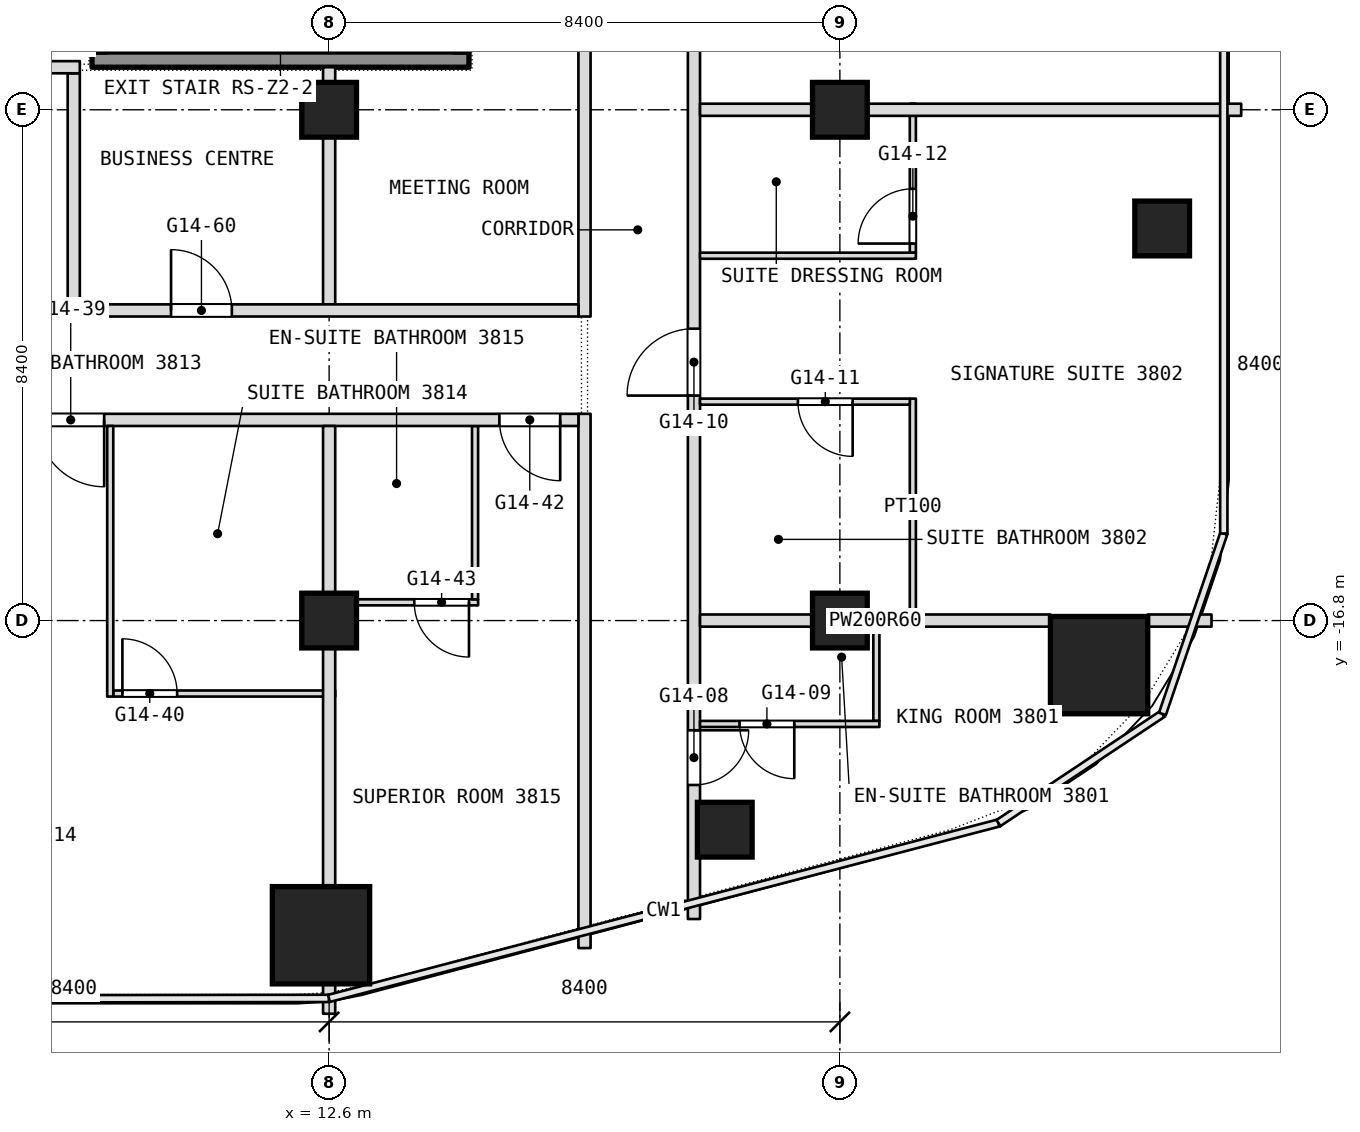
"""IFC4 building model, lengths in metres.
Left out: names, types, materials, properties, quantities, classifications, styles, units other than length and angle.
Written with IfcOpenShell. Run it as: python <this file> out.ifc"""

import sys

from ifc_helpers import new_model, si_unit, direction, frame, frame_2d, origin, origin_2d, place, context, subcontext, project, spatial, rectangle, extrude, element, fill, save


model = new_model("IFC4")
c1 = context("Model", 3, precision=1e-05, world=origin(), true_north=direction((0.0, 1.0)))
c2 = subcontext(c1, "Body", "Model", "MODEL_VIEW")
j1 = project(units=[si_unit("LENGTHUNIT", "METRE"), si_unit("PLANEANGLEUNIT", "RADIAN")], contexts=[c1])
p1 = place(None, origin())
s1 = spatial("IfcSite", under=j1, at=p1, CompositionType="ELEMENT")
p2 = place(p1, origin())
s2 = spatial("IfcBuilding", under=s1, at=p2, CompositionType="ELEMENT")
p3 = place(p2, frame((0.0, 0.0, 162.5)))
s3 = spatial("IfcBuildingStorey", under=s2, at=p3, CompositionType="ELEMENT", Elevation=162.5)
for number, where, z_axis, x_axis in (
    (1, (12.466, -21.975, 0.0), (0.0, 0.0, 1.0), (1.0, 0.0, 0.0)),
    (2, (25.263, -17.533, 0.0), (0.0, 0.0, 1.0), (1.0, 0.0, 0.0)),
):
    element("IfcColumn", number, at=place(p3, frame(where, z_axis=z_axis, x_axis=x_axis)), inside=s3, PredefinedType="COLUMN", context=c2, shape_type="SweptSolid", body=[
        extrude(rectangle(XDim=1.6, YDim=1.6, at=origin_2d()), origin(), (0.0, 0.0, 1.0), 3.6),
    ])
for number, where, z_axis, x_axis in (
    (3, (12.6, -16.8, 0.0), (0.0, 0.0, 1.0), (1.0, 0.0, 0.0)),
    (4, (12.6, -8.4, 0.0), (0.0, 0.0, 1.0), (1.0, 0.0, 0.0)),
    (5, (21.0, -16.8, 0.0), (0.0, 0.0, 1.0), (1.0, 0.0, 0.0)),
    (6, (21.0, -8.4, 0.0), (0.0, 0.0, 1.0), (1.0, 0.0, 0.0)),
    (7, (26.3, -10.352, 0.0), (0.0, 0.0, 1.0), (1.0, 0.0, 0.0)),
    (8, (19.107, -20.239, 0.0), (0.0, 0.0, 1.0), (1.0, 0.0, 0.0)),
):
    element("IfcColumn", number, at=place(p3, frame(where, z_axis=z_axis, x_axis=x_axis)), inside=s3, PredefinedType="COLUMN", context=c2, shape_type="SweptSolid", body=[
        extrude(rectangle(XDim=0.9, YDim=0.9, at=origin_2d()), origin(), (0.0, 0.0, 1.0), 3.6),
    ])
p4 = place(p3, frame((22.2, -16.7, 0.0), z_axis=(0.0, 0.0, 1.0), x_axis=(0.0, 1.0, 0.0)))
e9 = element("IfcWall", 9, at=p4, inside=s3, PredefinedType="PARTITIONING", context=c2, shape_type="SweptSolid", body=[
    extrude(rectangle(XDim=3.55, YDim=0.1, at=frame_2d((1.775, 0.0))), origin(), (0.0, 0.0, 1.0), 3.34),
])
p5 = place(p3, frame((22.2, -10.75, 0.0), z_axis=(0.0, 0.0, 1.0), x_axis=(0.0, 1.0, 0.0)))
e10 = element("IfcWall", 10, at=p5, inside=s3, PredefinedType="PARTITIONING", context=c2, shape_type="SweptSolid", body=[
    extrude(rectangle(XDim=2.45, YDim=0.1, at=frame_2d((1.225, 0.0))), origin(), (0.0, 0.0, 1.0), 3.34),
])
p6 = place(p5, frame((0.15, 0.0, 0.0)))
e11 = element("IfcOpeningElement", 11, at=p6, cuts=e10, PredefinedType="OPENING", context=c2, shape_type="SweptSolid", body=[
    extrude(rectangle(XDim=0.9, YDim=2.1, at=frame_2d((0.45, 1.05))), frame((0.0, 0.05, 0.0), z_axis=(0.0, -1.0, 0.0), x_axis=(1.0, 0.0, 0.0)), (0.0, 0.0, 1.0), 0.1),
])
p7 = place(p3, frame((21.6, -18.45, 0.0), z_axis=(0.0, 0.0, 1.0), x_axis=(0.0, 1.0, 0.0)))
e12 = element("IfcWall", 12, at=p7, inside=s3, PredefinedType="PARTITIONING", context=c2, shape_type="SweptSolid", body=[
    extrude(rectangle(XDim=1.75, YDim=0.1, at=frame_2d((0.875, 0.0))), origin(), (0.0, 0.0, 1.0), 3.34),
])
p8 = place(p3, frame((18.6, -21.708, 0.0), z_axis=(0.0, 0.0, 1.0), x_axis=(0.0, 1.0, 0.0)))
e13 = element("IfcWall", 13, at=p8, inside=s3, PredefinedType="PARTITIONING", context=c2, shape_type="SweptSolid", body=[
    extrude(rectangle(XDim=49.648, YDim=0.2, at=frame_2d((24.824, 0.0))), origin(), (0.0, 0.0, 1.0), 3.34),
])
p9 = place(p8, frame((2.204, 0.0, 0.0)))
e14 = element("IfcOpeningElement", 14, at=p9, cuts=e13, PredefinedType="OPENING", context=c2, shape_type="SweptSolid", body=[
    extrude(rectangle(XDim=0.9, YDim=2.1, at=frame_2d((0.45, 1.05))), frame((0.0, 0.1, 0.0), z_axis=(0.0, -1.0, 0.0), x_axis=(1.0, 0.0, 0.0)), (0.0, 0.0, 1.0), 0.2),
])
p10 = place(p8, frame((8.608, 0.0, 0.0)))
e15 = element("IfcOpeningElement", 15, at=p10, cuts=e13, PredefinedType="OPENING", context=c2, shape_type="SweptSolid", body=[
    extrude(rectangle(XDim=1.1, YDim=2.1, at=frame_2d((0.55, 1.05))), frame((0.0, 0.1, 0.0), z_axis=(0.0, -1.0, 0.0), x_axis=(1.0, 0.0, 0.0)), (0.0, 0.0, 1.0), 0.2),
])
p11 = place(p8, frame((16.608, 0.0, 0.0)))
e16 = element("IfcOpeningElement", 16, at=p11, cuts=e13, PredefinedType="OPENING", context=c2, shape_type="SweptSolid", body=[
    extrude(rectangle(XDim=1.8, YDim=2.1, at=frame_2d((0.9, 1.05))), frame((0.0, 0.1, 0.0), z_axis=(0.0, -1.0, 0.0), x_axis=(1.0, 0.0, 0.0)), (0.0, 0.0, 1.0), 0.2),
])
p12 = place(p8, frame((27.458, 0.0, 0.0)))
e17 = element("IfcOpeningElement", 17, at=p12, cuts=e13, PredefinedType="OPENING", context=c2, shape_type="SweptSolid", body=[
    extrude(rectangle(XDim=1.1, YDim=2.1, at=frame_2d((0.55, 1.05))), frame((0.0, 0.1, 0.0), z_axis=(0.0, -1.0, 0.0), x_axis=(1.0, 0.0, 0.0)), (0.0, 0.0, 1.0), 0.2),
])
p13 = place(p8, frame((30.508, 0.0, 0.0)))
e18 = element("IfcOpeningElement", 18, at=p13, cuts=e13, PredefinedType="OPENING", context=c2, shape_type="SweptSolid", body=[
    extrude(rectangle(XDim=1.0, YDim=2.1, at=frame_2d((0.5, 1.05))), frame((0.0, 0.1, 0.0), z_axis=(0.0, -1.0, 0.0), x_axis=(1.0, 0.0, 0.0)), (0.0, 0.0, 1.0), 0.2),
])
p14 = place(p8, frame((37.108, 0.0, 0.0)))
e19 = element("IfcOpeningElement", 19, at=p14, cuts=e13, PredefinedType="OPENING", context=c2, shape_type="SweptSolid", body=[
    extrude(rectangle(XDim=1.0, YDim=2.1, at=frame_2d((0.5, 1.05))), frame((0.0, 0.1, 0.0), z_axis=(0.0, -1.0, 0.0), x_axis=(1.0, 0.0, 0.0)), (0.0, 0.0, 1.0), 0.2),
])
p15 = place(p8, frame((42.608, 0.0, 0.0)))
e20 = element("IfcOpeningElement", 20, at=p15, cuts=e13, PredefinedType="OPENING", context=c2, shape_type="SweptSolid", body=[
    extrude(rectangle(XDim=1.0, YDim=2.1, at=frame_2d((0.5, 1.05))), frame((0.0, 0.1, 0.0), z_axis=(0.0, -1.0, 0.0), x_axis=(1.0, 0.0, 0.0)), (0.0, 0.0, 1.0), 0.2),
])
p16 = place(p8, frame((44.608, 0.0, 0.0)))
e21 = element("IfcOpeningElement", 21, at=p16, cuts=e13, PredefinedType="OPENING", context=c2, shape_type="SweptSolid", body=[
    extrude(rectangle(XDim=1.0, YDim=2.1, at=frame_2d((0.5, 1.05))), frame((0.0, 0.1, 0.0), z_axis=(0.0, -1.0, 0.0), x_axis=(1.0, 0.0, 0.0)), (0.0, 0.0, 1.0), 0.2),
])
p17 = place(p3, frame((18.7, -18.5, 0.0), z_axis=(0.0, 0.0, 1.0), x_axis=(1.0, 0.0, 0.0)))
e22 = element("IfcWall", 22, at=p17, inside=s3, PredefinedType="PARTITIONING", context=c2, shape_type="SweptSolid", body=[
    extrude(rectangle(XDim=2.95, YDim=0.1, at=frame_2d((1.475, 0.0))), origin(), (0.0, 0.0, 1.0), 3.34),
])
p18 = place(p17, frame((0.65, 0.0, 0.0)))
e23 = element("IfcOpeningElement", 23, at=p18, cuts=e22, PredefinedType="OPENING", context=c2, shape_type="SweptSolid", body=[
    extrude(rectangle(XDim=0.9, YDim=2.1, at=frame_2d((0.45, 1.05))), frame((0.0, 0.05, 0.0), z_axis=(0.0, -1.0, 0.0), x_axis=(1.0, 0.0, 0.0)), (0.0, 0.0, 1.0), 0.1),
])
p19 = place(p3, frame((9.05, -18.0, 0.0), z_axis=(0.0, 0.0, 1.0), x_axis=(1.0, 0.0, 0.0)))
e24 = element("IfcWall", 24, at=p19, inside=s3, PredefinedType="PARTITIONING", context=c2, shape_type="SweptSolid", body=[
    extrude(rectangle(XDim=3.65, YDim=0.1, at=frame_2d((1.825, 0.0))), origin(), (0.0, 0.0, 1.0), 3.34),
])
p20 = place(p19, frame((0.15, 0.0, 0.0)))
e25 = element("IfcOpeningElement", 25, at=p20, cuts=e24, PredefinedType="OPENING", context=c2, shape_type="SweptSolid", body=[
    extrude(rectangle(XDim=0.9, YDim=2.1, at=frame_2d((0.45, 1.05))), frame((0.0, 0.05, 0.0), z_axis=(0.0, -1.0, 0.0), x_axis=(1.0, 0.0, 0.0)), (0.0, 0.0, 1.0), 0.1),
])
p21 = place(p3, frame((16.8, -22.186, 0.0), z_axis=(0.0, 0.0, 1.0), x_axis=(0.0, 1.0, 0.0)))
e26 = element("IfcWall", 26, at=p21, inside=s3, PredefinedType="PARTITIONING", context=c2, shape_type="SweptSolid", body=[
    extrude(rectangle(XDim=8.786, YDim=0.2, at=frame_2d((4.393, 0.0))), origin(), (0.0, 0.0, 1.0), 3.34),
])
p22 = place(p3, frame((16.8, -11.8, 0.0), z_axis=(0.0, 0.0, 1.0), x_axis=(0.0, 1.0, 0.0)))
e27 = element("IfcWall", 27, at=p22, inside=s3, PredefinedType="PARTITIONING", context=c2, shape_type="SweptSolid", body=[
    extrude(rectangle(XDim=9.9, YDim=0.2, at=frame_2d((4.95, 0.0))), origin(), (0.0, 0.0, 1.0), 3.34),
])
p23 = place(p3, frame((18.7, -16.8, 0.0), z_axis=(0.0, 0.0, 1.0), x_axis=(1.0, 0.0, 0.0)))
e28 = element("IfcWall", 28, at=p23, inside=s3, PredefinedType="PARTITIONING", context=c2, shape_type="SweptSolid", body=[
    extrude(rectangle(XDim=5.763, YDim=0.2, at=frame_2d((2.881, 0.0))), origin(), (0.0, 0.0, 1.0), 2.89),
])
p24 = place(p3, frame((26.063, -16.8, 0.0), z_axis=(0.0, 0.0, 1.0), x_axis=(1.0, 0.0, 0.0)))
e29 = element("IfcWall", 29, at=p24, inside=s3, PredefinedType="PARTITIONING", context=c2, shape_type="SweptSolid", body=[
    extrude(rectangle(XDim=1.049, YDim=0.2, at=frame_2d((0.524, 0.0))), origin(), (0.0, 0.0, 1.0), 3.34),
])
p25 = place(p3, frame((12.7, -16.5, 0.0), z_axis=(0.0, 0.0, 1.0), x_axis=(1.0, 0.0, 0.0)))
e30 = element("IfcWall", 30, at=p25, inside=s3, PredefinedType="PARTITIONING", context=c2, shape_type="SweptSolid", body=[
    extrude(rectangle(XDim=2.35, YDim=0.1, at=frame_2d((1.175, 0.0))), origin(), (0.0, 0.0, 1.0), 3.34),
])
p26 = place(p25, frame((1.3, 0.0, 0.0)))
e31 = element("IfcOpeningElement", 31, at=p26, cuts=e30, PredefinedType="OPENING", context=c2, shape_type="SweptSolid", body=[
    extrude(rectangle(XDim=0.9, YDim=2.1, at=frame_2d((0.45, 1.05))), frame((0.0, 0.05, 0.0), z_axis=(0.0, -1.0, 0.0), x_axis=(1.0, 0.0, 0.0)), (0.0, 0.0, 1.0), 0.1),
])
p27 = place(p3, frame((15.0, -16.45, 0.0), z_axis=(0.0, 0.0, 1.0), x_axis=(0.0, 1.0, 0.0)))
e32 = element("IfcWall", 32, at=p27, inside=s3, PredefinedType="PARTITIONING", context=c2, shape_type="SweptSolid", body=[
    extrude(rectangle(XDim=2.85, YDim=0.1, at=frame_2d((1.425, 0.0))), origin(), (0.0, 0.0, 1.0), 3.34),
])
p28 = place(p3, frame((-3.2, -13.5, 0.0), z_axis=(0.0, 0.0, 1.0), x_axis=(1.0, 0.0, 0.0)))
e33 = element("IfcWall", 33, at=p28, inside=s3, PredefinedType="PARTITIONING", context=c2, shape_type="SweptSolid", body=[
    extrude(rectangle(XDim=19.9, YDim=0.2, at=frame_2d((9.95, 0.0))), origin(), (0.0, 0.0, 1.0), 3.34),
])
p29 = place(p28, frame((1.8, 0.0, 0.0)))
e34 = element("IfcOpeningElement", 34, at=p29, cuts=e33, PredefinedType="OPENING", context=c2, shape_type="SweptSolid", body=[
    extrude(rectangle(XDim=1.0, YDim=2.1, at=frame_2d((0.5, 1.05))), frame((0.0, 0.1, 0.0), z_axis=(0.0, -1.0, 0.0), x_axis=(1.0, 0.0, 0.0)), (0.0, 0.0, 1.0), 0.2),
])
p30 = place(p28, frame((3.6, 0.0, 0.0)))
e35 = element("IfcOpeningElement", 35, at=p30, cuts=e33, PredefinedType="OPENING", context=c2, shape_type="SweptSolid", body=[
    extrude(rectangle(XDim=1.0, YDim=2.1, at=frame_2d((0.5, 1.05))), frame((0.0, 0.1, 0.0), z_axis=(0.0, -1.0, 0.0), x_axis=(1.0, 0.0, 0.0)), (0.0, 0.0, 1.0), 0.2),
])
p31 = place(p28, frame((11.0, 0.0, 0.0)))
e36 = element("IfcOpeningElement", 36, at=p31, cuts=e33, PredefinedType="OPENING", context=c2, shape_type="SweptSolid", body=[
    extrude(rectangle(XDim=1.1, YDim=2.1, at=frame_2d((0.55, 1.05))), frame((0.0, 0.1, 0.0), z_axis=(0.0, -1.0, 0.0), x_axis=(1.0, 0.0, 0.0)), (0.0, 0.0, 1.0), 0.2),
])
p32 = place(p28, frame((18.6, 0.0, 0.0)))
e37 = element("IfcOpeningElement", 37, at=p32, cuts=e33, PredefinedType="OPENING", context=c2, shape_type="SweptSolid", body=[
    extrude(rectangle(XDim=1.0, YDim=2.1, at=frame_2d((0.5, 1.05))), frame((0.0, 0.1, 0.0), z_axis=(0.0, -1.0, 0.0), x_axis=(1.0, 0.0, 0.0)), (0.0, 0.0, 1.0), 0.2),
])
p33 = place(p3, frame((18.7, -13.2, 0.0), z_axis=(0.0, 0.0, 1.0), x_axis=(1.0, 0.0, 0.0)))
e38 = element("IfcWall", 38, at=p33, inside=s3, PredefinedType="PARTITIONING", context=c2, shape_type="SweptSolid", body=[
    extrude(rectangle(XDim=3.45, YDim=0.1, at=frame_2d((1.725, 0.0))), origin(), (0.0, 0.0, 1.0), 3.34),
])
p34 = place(p33, frame((1.61, 0.0, 0.0)))
e39 = element("IfcOpeningElement", 39, at=p34, cuts=e38, PredefinedType="OPENING", context=c2, shape_type="SweptSolid", body=[
    extrude(rectangle(XDim=0.9, YDim=2.1, at=frame_2d((0.45, 1.05))), frame((0.0, 0.05, 0.0), z_axis=(0.0, -1.0, 0.0), x_axis=(1.0, 0.0, 0.0)), (0.0, 0.0, 1.0), 0.1),
])
p35 = place(p3, frame((12.6, -23.266, 0.0), z_axis=(0.0, 0.0, 1.0), x_axis=(0.0, 1.0, 0.0)))
e40 = element("IfcWall", 40, at=p35, inside=s3, PredefinedType="PARTITIONING", context=c2, shape_type="SweptSolid", body=[
    extrude(rectangle(XDim=0.491, YDim=0.2, at=frame_2d((0.246, 0.0))), origin(), (0.0, 0.0, 1.0), 3.34),
])
p36 = place(p3, frame((12.6, -21.175, 0.0), z_axis=(0.0, 0.0, 1.0), x_axis=(0.0, 1.0, 0.0)))
e41 = element("IfcWall", 41, at=p36, inside=s3, PredefinedType="PARTITIONING", context=c2, shape_type="SweptSolid", body=[
    extrude(rectangle(XDim=7.575, YDim=0.2, at=frame_2d((3.788, 0.0))), origin(), (0.0, 0.0, 1.0), 3.34),
])
p37 = place(p3, frame((12.6, -11.6, 0.0), z_axis=(0.0, 0.0, 1.0), x_axis=(0.0, 1.0, 0.0)))
e42 = element("IfcWall", 42, at=p37, inside=s3, PredefinedType="PARTITIONING", context=c2, shape_type="SweptSolid", body=[
    extrude(rectangle(XDim=3.9, YDim=0.2, at=frame_2d((1.95, 0.0))), origin(), (0.0, 0.0, 1.0), 3.34),
])
p38 = place(p3, frame((-4.1, -11.7, 0.0), z_axis=(0.0, 0.0, 1.0), x_axis=(1.0, 0.0, 0.0)))
e43 = element("IfcWall", 43, at=p38, inside=s3, PredefinedType="PARTITIONING", context=c2, shape_type="SweptSolid", body=[
    extrude(rectangle(XDim=20.8, YDim=0.2, at=frame_2d((10.4, 0.0))), origin(), (0.0, 0.0, 1.0), 3.34),
])
p39 = place(p38, frame((14.1, 0.0, 0.0)))
e44 = element("IfcOpeningElement", 44, at=p39, cuts=e43, PredefinedType="OPENING", context=c2, shape_type="SweptSolid", body=[
    extrude(rectangle(XDim=1.0, YDim=2.1, at=frame_2d((0.5, 1.05))), frame((0.0, 0.1, 0.0), z_axis=(0.0, -1.0, 0.0), x_axis=(1.0, 0.0, 0.0)), (0.0, 0.0, 1.0), 0.2),
])
p40 = place(p38, frame((5.7, 0.0, 0.0)))
e45 = element("IfcOpeningElement", 45, at=p40, cuts=e43, PredefinedType="OPENING", context=c2, shape_type="SweptSolid", body=[
    extrude(rectangle(XDim=1.0, YDim=2.1, at=frame_2d((0.5, 1.05))), frame((0.0, 0.1, 0.0), z_axis=(0.0, -1.0, 0.0), x_axis=(1.0, 0.0, 0.0)), (0.0, 0.0, 1.0), 0.2),
])
p41 = place(p3, frame((18.7, -10.8, 0.0), z_axis=(0.0, 0.0, 1.0), x_axis=(1.0, 0.0, 0.0)))
e46 = element("IfcWall", 46, at=p41, inside=s3, PredefinedType="PARTITIONING", context=c2, shape_type="SweptSolid", body=[
    extrude(rectangle(XDim=3.55, YDim=0.1, at=frame_2d((1.775, 0.0))), origin(), (0.0, 0.0, 1.0), 3.34),
])
p42 = place(p3, frame((9.0, -18.05, 0.0), z_axis=(0.0, 0.0, 1.0), x_axis=(0.0, 1.0, 0.0)))
e47 = element("IfcWall", 47, at=p42, inside=s3, PredefinedType="PARTITIONING", context=c2, shape_type="SweptSolid", body=[
    extrude(rectangle(XDim=4.45, YDim=0.1, at=frame_2d((2.225, 0.0))), origin(), (0.0, 0.0, 1.0), 3.34),
])
p43 = place(p3, frame((8.4, -11.6, 0.0), z_axis=(0.0, 0.0, 1.0), x_axis=(0.0, 1.0, 0.0)))
e48 = element("IfcWall", 48, at=p43, inside=s3, PredefinedType="PARTITIONING", context=c2, shape_type="SweptSolid", body=[
    extrude(rectangle(XDim=3.8, YDim=0.2, at=frame_2d((1.9, 0.0))), origin(), (0.0, 0.0, 1.0), 3.34),
])
p44 = place(p3, frame((18.7, -8.4, 0.0), z_axis=(0.0, 0.0, 1.0), x_axis=(1.0, 0.0, 0.0)))
e49 = element("IfcWall", 49, at=p44, inside=s3, PredefinedType="PARTITIONING", context=c2, shape_type="SweptSolid", body=[
    extrude(rectangle(XDim=8.9, YDim=0.2, at=frame_2d((4.45, 0.0))), origin(), (0.0, 0.0, 1.0), 2.89),
])
p45 = place(p3, frame((7.2, -7.7, 0.0), z_axis=(0.0, 0.0, 1.0), x_axis=(1.0, 0.0, 0.0)))
e50 = element("IfcWall", 50, at=p45, inside=s3, PredefinedType="PARTITIONING", context=c2, shape_type="SweptSolid", body=[
    extrude(rectangle(XDim=1.3, YDim=0.2, at=frame_2d((0.65, 0.0))), origin(), (0.0, 0.0, 1.0), 3.34),
])
p46 = place(p3, frame((8.7, -7.575, 0.1), z_axis=(0.0, 0.0, 1.0), x_axis=(1.0, 0.0, 0.0)))
e51 = element("IfcWall", 51, at=p46, inside=s3, PredefinedType="SHEAR", context=c2, shape_type="SweptSolid", body=[
    extrude(rectangle(XDim=6.2, YDim=0.25, at=frame_2d((3.1, 0.0))), origin(), (0.0, 0.0, 1.0), 3.6),
])
p47 = place(p6, origin())
e52 = element("IfcDoor", 52, at=p47, inside=s3, OperationType="SINGLE_SWING_LEFT", PredefinedType="DOOR", context=c2, shape_type="SweptSolid", body=[
    extrude(rectangle(XDim=0.9, YDim=2.1, at=frame_2d((0.45, 1.05))), frame((0.0, 0.025, 0.0), z_axis=(0.0, -1.0, 0.0), x_axis=(1.0, 0.0, 0.0)), (0.0, 0.0, 1.0), 0.05),
])
fill(e11, e52)
p48 = place(p9, origin())
e53 = element("IfcDoor", 53, at=p48, inside=s3, OperationType="SINGLE_SWING_LEFT", PredefinedType="DOOR", context=c2, shape_type="SweptSolid", body=[
    extrude(rectangle(XDim=0.9, YDim=2.1, at=frame_2d((0.45, 1.05))), frame((0.0, 0.025, 0.0), z_axis=(0.0, -1.0, 0.0), x_axis=(1.0, 0.0, 0.0)), (0.0, 0.0, 1.0), 0.05),
])
fill(e14, e53)
p49 = place(p10, origin())
e54 = element("IfcDoor", 54, at=p49, inside=s3, OperationType="SINGLE_SWING_RIGHT", PredefinedType="DOOR", context=c2, shape_type="SweptSolid", body=[
    extrude(rectangle(XDim=1.1, YDim=2.1, at=frame_2d((0.55, 1.05))), frame((0.0, 0.025, 0.0), z_axis=(0.0, -1.0, 0.0), x_axis=(1.0, 0.0, 0.0)), (0.0, 0.0, 1.0), 0.05),
])
fill(e15, e54)
p50 = place(p18, origin())
e55 = element("IfcDoor", 55, at=p50, inside=s3, OperationType="SINGLE_SWING_LEFT", PredefinedType="DOOR", context=c2, shape_type="SweptSolid", body=[
    extrude(rectangle(XDim=0.9, YDim=2.1, at=frame_2d((0.45, 1.05))), frame((0.0, 0.025, 0.0), z_axis=(0.0, -1.0, 0.0), x_axis=(1.0, 0.0, 0.0)), (0.0, 0.0, 1.0), 0.05),
])
fill(e23, e55)
p51 = place(p20, origin())
e56 = element("IfcDoor", 56, at=p51, inside=s3, OperationType="SINGLE_SWING_LEFT", PredefinedType="DOOR", context=c2, shape_type="SweptSolid", body=[
    extrude(rectangle(XDim=0.9, YDim=2.1, at=frame_2d((0.45, 1.05))), frame((0.0, 0.025, 0.0), z_axis=(0.0, -1.0, 0.0), x_axis=(1.0, 0.0, 0.0)), (0.0, 0.0, 1.0), 0.05),
])
fill(e25, e56)
p52 = place(p26, origin())
e57 = element("IfcDoor", 57, at=p52, inside=s3, OperationType="SINGLE_SWING_RIGHT", PredefinedType="DOOR", context=c2, shape_type="SweptSolid", body=[
    extrude(rectangle(XDim=0.9, YDim=2.1, at=frame_2d((0.45, 1.05))), frame((0.0, 0.025, 0.0), z_axis=(0.0, -1.0, 0.0), x_axis=(1.0, 0.0, 0.0)), (0.0, 0.0, 1.0), 0.05),
])
fill(e31, e57)
p53 = place(p31, origin())
e58 = element("IfcDoor", 58, at=p53, inside=s3, OperationType="SINGLE_SWING_LEFT", PredefinedType="DOOR", context=c2, shape_type="SweptSolid", body=[
    extrude(rectangle(XDim=1.1, YDim=2.1, at=frame_2d((0.55, 1.05))), frame((0.0, 0.025, 0.0), z_axis=(0.0, -1.0, 0.0), x_axis=(1.0, 0.0, 0.0)), (0.0, 0.0, 1.0), 0.05),
])
fill(e36, e58)
p54 = place(p32, origin())
e59 = element("IfcDoor", 59, at=p54, inside=s3, OperationType="SINGLE_SWING_LEFT", PredefinedType="DOOR", context=c2, shape_type="SweptSolid", body=[
    extrude(rectangle(XDim=1.0, YDim=2.1, at=frame_2d((0.5, 1.05))), frame((0.0, 0.025, 0.0), z_axis=(0.0, -1.0, 0.0), x_axis=(1.0, 0.0, 0.0)), (0.0, 0.0, 1.0), 0.05),
])
fill(e37, e59)
p55 = place(p34, origin())
e60 = element("IfcDoor", 60, at=p55, inside=s3, OperationType="SINGLE_SWING_LEFT", PredefinedType="DOOR", context=c2, shape_type="SweptSolid", body=[
    extrude(rectangle(XDim=0.9, YDim=2.1, at=frame_2d((0.45, 1.05))), frame((0.0, 0.025, 0.0), z_axis=(0.0, -1.0, 0.0), x_axis=(1.0, 0.0, 0.0)), (0.0, 0.0, 1.0), 0.05),
])
fill(e39, e60)
p56 = place(p39, origin())
e61 = element("IfcDoor", 61, at=p56, inside=s3, OperationType="SINGLE_SWING_RIGHT", PredefinedType="DOOR", context=c2, shape_type="SweptSolid", body=[
    extrude(rectangle(XDim=1.0, YDim=2.1, at=frame_2d((0.5, 1.05))), frame((0.0, 0.025, 0.0), z_axis=(0.0, -1.0, 0.0), x_axis=(1.0, 0.0, 0.0)), (0.0, 0.0, 1.0), 0.05),
])
fill(e44, e61)
save(model, sys.argv[1])
